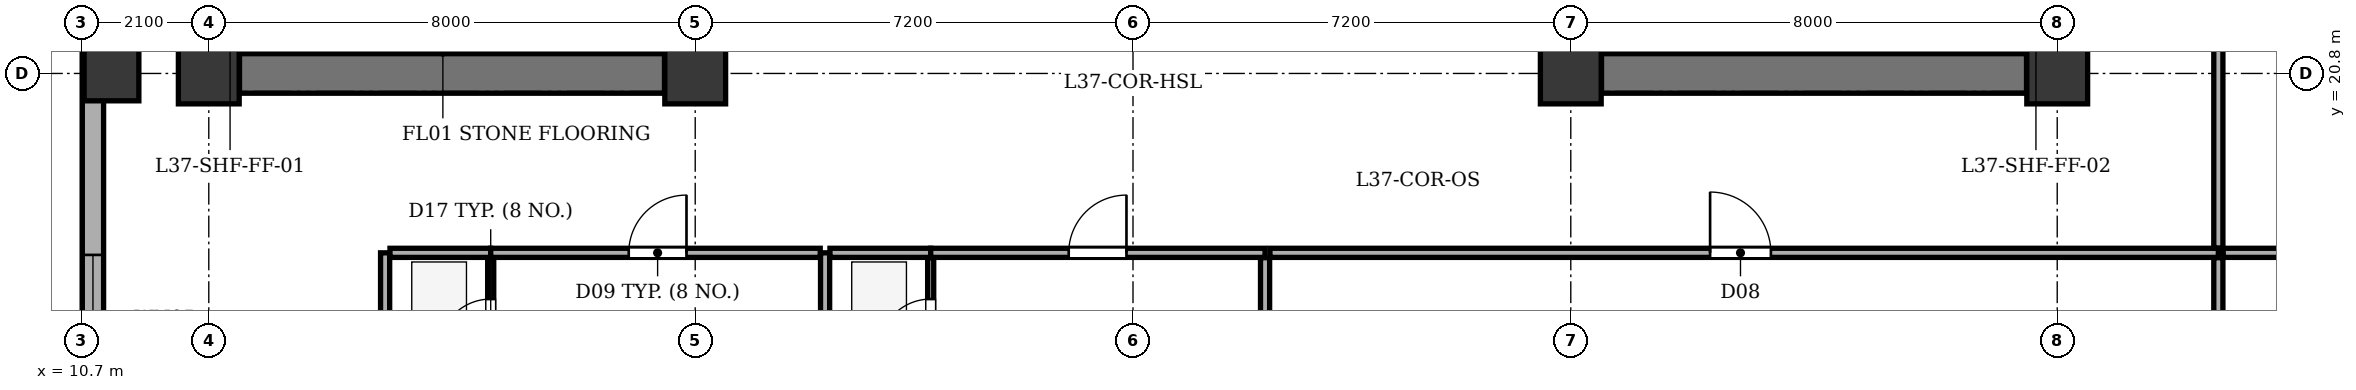
"""IFC4 building model, lengths in metres.
Left out: names, types, materials, properties, quantities, classifications, styles, units other than length and angle.
Written with IfcOpenShell. Run it as: python <this file> out.ifc"""

import sys

from ifc_helpers import new_model, si_unit, direction, frame, frame_2d, origin, origin_2d, place, context, subcontext, project, spatial, rectangle, extrude, element, fill, save


model = new_model("IFC4")
c1 = context("Model", 3, precision=1e-05, world=origin(), true_north=direction((0.0, 1.0)))
c2 = subcontext(c1, "Body", "Model", "MODEL_VIEW")
j1 = project(units=[si_unit("LENGTHUNIT", "METRE"), si_unit("PLANEANGLEUNIT", "RADIAN")], contexts=[c1])
p1 = place(None, origin())
s1 = spatial("IfcSite", under=j1, at=p1, CompositionType="ELEMENT")
p2 = place(p1, origin())
s2 = spatial("IfcBuilding", under=s1, at=p2, CompositionType="ELEMENT")
p3 = place(p2, frame((0.0, 0.0, 148.3)))
s3 = spatial("IfcBuildingStorey", under=s2, at=p3, CompositionType="ELEMENT", Elevation=148.3)
for number, where, z_axis, x_axis in (
    (1, (12.8, 20.8, 0.0), (0.0, 0.0, 1.0), (1.0, 0.0, 0.0)),
    (2, (20.8, 20.8, 0.0), (0.0, 0.0, 1.0), (1.0, 0.0, 0.0)),
    (3, (35.2, 20.8, 0.0), (0.0, 0.0, 1.0), (1.0, 0.0, 0.0)),
    (4, (43.2, 20.8, 0.0), (0.0, 0.0, 1.0), (1.0, 0.0, 0.0)),
):
    element("IfcColumn", number, at=place(p3, frame(where, z_axis=z_axis, x_axis=x_axis)), inside=s3, PredefinedType="COLUMN", context=c2, shape_type="SweptSolid", body=[
        extrude(rectangle(XDim=1.0, YDim=1.0, at=origin_2d()), origin(), (0.0, 0.0, 1.0), 3.5),
    ])
p4 = place(p3, frame((11.2, 20.8, 0.0), z_axis=(0.0, 0.0, 1.0), x_axis=(1.0, 0.0, 0.0)))
e5 = element("IfcColumn", 5, at=p4, inside=s3, PredefinedType="COLUMN", context=c2, shape_type="SweptSolid", body=[
    extrude(rectangle(XDim=0.9, YDim=0.9, at=origin_2d()), origin(), (0.0, 0.0, 1.0), 3.5),
])
p5 = place(p3, frame((10.895, 6.5, 0.0), z_axis=(0.0, 0.0, 1.0), x_axis=(0.0, 1.0, 0.0)))
e6 = element("IfcWall", 6, at=p5, inside=s3, PredefinedType="STANDARD", context=c2, shape_type="SweptSolid", body=[
    extrude(rectangle(XDim=35.0, YDim=0.35, at=frame_2d((17.5, 0.0))), origin(), (0.0, 0.0, 1.0), 2.785),
])
p6 = place(p5, frame((3.31, 0.0, 0.75)))
e7 = element("IfcOpeningElement", 7, at=p6, cuts=e6, PredefinedType="OPENING", context=c2, shape_type="SweptSolid", body=[
    extrude(rectangle(XDim=1.6, YDim=1.75, at=frame_2d((0.8, 0.875))), frame((0.0, 0.185, 0.0), z_axis=(0.0, -1.0, 0.0), x_axis=(1.0, 0.0, 0.0)), (0.0, 0.0, 1.0), 0.37),
])
p7 = place(p5, frame((9.216, 0.0, 0.75)))
e8 = element("IfcOpeningElement", 8, at=p7, cuts=e6, PredefinedType="OPENING", context=c2, shape_type="SweptSolid", body=[
    extrude(rectangle(XDim=2.1, YDim=1.75, at=frame_2d((1.05, 0.875))), frame((0.0, 0.185, 0.0), z_axis=(0.0, -1.0, 0.0), x_axis=(1.0, 0.0, 0.0)), (0.0, 0.0, 1.0), 0.37),
])
p8 = place(p5, frame((17.164, 0.0, 0.75)))
e9 = element("IfcOpeningElement", 9, at=p8, cuts=e6, PredefinedType="OPENING", context=c2, shape_type="SweptSolid", body=[
    extrude(rectangle(XDim=1.6, YDim=1.75, at=frame_2d((0.8, 0.875))), frame((0.0, 0.185, 0.0), z_axis=(0.0, -1.0, 0.0), x_axis=(1.0, 0.0, 0.0)), (0.0, 0.0, 1.0), 0.37),
])
p9 = place(p5, frame((22.386, 0.0, 0.75)))
e10 = element("IfcOpeningElement", 10, at=p9, cuts=e6, PredefinedType="OPENING", context=c2, shape_type="SweptSolid", body=[
    extrude(rectangle(XDim=2.1, YDim=1.75, at=frame_2d((1.05, 0.875))), frame((0.0, 0.185, 0.0), z_axis=(0.0, -1.0, 0.0), x_axis=(1.0, 0.0, 0.0)), (0.0, 0.0, 1.0), 0.37),
])
p10 = place(p5, frame((28.671, 0.0, 0.75)))
e11 = element("IfcOpeningElement", 11, at=p10, cuts=e6, PredefinedType="OPENING", context=c2, shape_type="SweptSolid", body=[
    extrude(rectangle(XDim=1.6, YDim=1.75, at=frame_2d((0.8, 0.875))), frame((0.0, 0.185, 0.0), z_axis=(0.0, -1.0, 0.0), x_axis=(1.0, 0.0, 0.0)), (0.0, 0.0, 1.0), 0.37),
])
p11 = place(p5, frame((31.755, 0.0, 0.75)))
e12 = element("IfcOpeningElement", 12, at=p11, cuts=e6, PredefinedType="OPENING", context=c2, shape_type="SweptSolid", body=[
    extrude(rectangle(XDim=1.6, YDim=1.75, at=frame_2d((0.8, 0.875))), frame((0.0, 0.185, 0.0), z_axis=(0.0, -1.0, 0.0), x_axis=(1.0, 0.0, 0.0)), (0.0, 0.0, 1.0), 0.37),
])
p12 = place(p3, frame((13.305, 20.8, 0.0), z_axis=(0.0, 0.0, 1.0), x_axis=(1.0, 0.0, 0.0)))
e13 = element("IfcWall", 13, at=p12, inside=s3, PredefinedType="SHEAR", context=c2, shape_type="SweptSolid", body=[
    extrude(rectangle(XDim=6.99, YDim=0.65, at=frame_2d((3.495, 0.0))), origin(), (0.0, 0.0, 1.0), 3.2),
])
p13 = place(p3, frame((16.435, 21.135, 0.0), z_axis=(0.0, 0.0, 1.0), x_axis=(0.0, 1.0, 0.0)))
e14 = element("IfcWall", 14, at=p13, inside=s3, PredefinedType="SHEAR", context=c2, shape_type="SweptSolid", body=[
    extrude(rectangle(XDim=12.13, YDim=0.25, at=frame_2d((6.065, 0.0))), origin(), (0.0, 0.0, 1.0), 3.2),
])
p14 = place(p13, frame((0.515, 0.0, 0.0)))
e15 = element("IfcOpeningElement", 15, at=p14, cuts=e14, PredefinedType="OPENING", context=c2, shape_type="SweptSolid", body=[
    extrude(rectangle(XDim=1.2, YDim=2.15, at=frame_2d((0.6, 1.075))), frame((0.0, 0.135, 0.0), z_axis=(0.0, -1.0, 0.0), x_axis=(1.0, 0.0, 0.0)), (0.0, 0.0, 1.0), 0.27),
])
p15 = place(p13, frame((2.665, 0.0, 0.0)))
e16 = element("IfcOpeningElement", 16, at=p15, cuts=e14, PredefinedType="OPENING", context=c2, shape_type="SweptSolid", body=[
    extrude(rectangle(XDim=1.15, YDim=2.15, at=frame_2d((0.575, 1.075))), frame((0.0, 0.135, 0.0), z_axis=(0.0, -1.0, 0.0), x_axis=(1.0, 0.0, 0.0)), (0.0, 0.0, 1.0), 0.27),
])
p16 = place(p3, frame((35.705, 20.8, 0.0), z_axis=(0.0, 0.0, 1.0), x_axis=(1.0, 0.0, 0.0)))
e17 = element("IfcWall", 17, at=p16, inside=s3, PredefinedType="SHEAR", context=c2, shape_type="SweptSolid", body=[
    extrude(rectangle(XDim=6.99, YDim=0.65, at=frame_2d((3.495, 0.0))), origin(), (0.0, 0.0, 1.0), 3.2),
])
p17 = place(p3, frame((39.565, 21.135, 0.0), z_axis=(0.0, 0.0, 1.0), x_axis=(0.0, 1.0, 0.0)))
e18 = element("IfcWall", 18, at=p17, inside=s3, PredefinedType="SHEAR", context=c2, shape_type="SweptSolid", body=[
    extrude(rectangle(XDim=12.13, YDim=0.25, at=frame_2d((6.065, 0.0))), origin(), (0.0, 0.0, 1.0), 3.2),
])
p18 = place(p17, frame((0.515, 0.0, 0.0)))
e19 = element("IfcOpeningElement", 19, at=p18, cuts=e18, PredefinedType="OPENING", context=c2, shape_type="SweptSolid", body=[
    extrude(rectangle(XDim=1.2, YDim=2.15, at=frame_2d((0.6, 1.075))), frame((0.0, 0.135, 0.0), z_axis=(0.0, -1.0, 0.0), x_axis=(1.0, 0.0, 0.0)), (0.0, 0.0, 1.0), 0.27),
])
p19 = place(p17, frame((2.665, 0.0, 0.0)))
e20 = element("IfcOpeningElement", 20, at=p19, cuts=e18, PredefinedType="OPENING", context=c2, shape_type="SweptSolid", body=[
    extrude(rectangle(XDim=1.15, YDim=2.15, at=frame_2d((0.575, 1.075))), frame((0.0, 0.135, 0.0), z_axis=(0.0, -1.0, 0.0), x_axis=(1.0, 0.0, 0.0)), (0.0, 0.0, 1.0), 0.27),
])
for number, where, z_axis, x_axis in (
    (21, (15.7, 1.875, 0.0), (0.0, 0.0, 1.0), (0.0, 1.0, 0.0)),
    (22, (22.936, 1.875, 0.0), (0.0, 0.0, 1.0), (0.0, 1.0, 0.0)),
):
    element("IfcWall", number, at=place(p3, frame(where, z_axis=z_axis, x_axis=x_axis)), inside=s3, PredefinedType="PARTITIONING", context=c2, shape_type="SweptSolid", body=[
        extrude(rectangle(XDim=15.975, YDim=0.15, at=frame_2d((7.988, 0.0))), origin(), (0.0, 0.0, 1.0), 3.2),
    ])
p20 = place(p3, frame((15.78, 17.85, 0.0), z_axis=(0.0, 0.0, 1.0), x_axis=(1.0, 0.0, 0.0)))
e23 = element("IfcWall", 23, at=p20, inside=s3, PredefinedType="PARTITIONING", context=c2, shape_type="SweptSolid", body=[
    extrude(rectangle(XDim=1.656, YDim=0.15, at=frame_2d((0.828, 0.0))), origin(), (0.0, 0.0, 1.0), 3.2),
])
p21 = place(p3, frame((17.437, 17.85, 0.0), z_axis=(0.0, 0.0, 1.0), x_axis=(1.0, 0.0, 0.0)))
e24 = element("IfcWall", 24, at=p21, inside=s3, PredefinedType="PARTITIONING", context=c2, shape_type="SweptSolid", body=[
    extrude(rectangle(XDim=5.419, YDim=0.15, at=frame_2d((2.71, 0.0))), origin(), (0.0, 0.0, 1.0), 3.2),
])
p22 = place(p21, frame((2.27, 0.0, 0.0)))
e25 = element("IfcOpeningElement", 25, at=p22, cuts=e24, PredefinedType="OPENING", context=c2, shape_type="SweptSolid", body=[
    extrude(rectangle(XDim=0.95, YDim=2.1, at=frame_2d((0.475, 1.05))), frame((0.0, 0.085, 0.0), z_axis=(0.0, -1.0, 0.0), x_axis=(1.0, 0.0, 0.0)), (0.0, 0.0, 1.0), 0.17),
])
p23 = place(p3, frame((17.437, 15.52, 0.0), z_axis=(0.0, 0.0, 1.0), x_axis=(0.0, 1.0, 0.0)))
e26 = element("IfcWall", 26, at=p23, inside=s3, PredefinedType="PARTITIONING", context=c2, shape_type="SweptSolid", body=[
    extrude(rectangle(XDim=2.25, YDim=0.1, at=frame_2d((1.125, 0.0))), origin(), (0.0, 0.0, 1.0), 3.2),
])
p24 = place(p23, frame((0.72, 0.0, 0.0)))
e27 = element("IfcOpeningElement", 27, at=p24, cuts=e26, PredefinedType="OPENING", context=c2, shape_type="SweptSolid", body=[
    extrude(rectangle(XDim=0.85, YDim=2.05, at=frame_2d((0.425, 1.025))), frame((0.0, 0.06, 0.0), z_axis=(0.0, -1.0, 0.0), x_axis=(1.0, 0.0, 0.0)), (0.0, 0.0, 1.0), 0.12),
])
p25 = place(p3, frame((23.016, 17.85, 0.0), z_axis=(0.0, 0.0, 1.0), x_axis=(1.0, 0.0, 0.0)))
e28 = element("IfcWall", 28, at=p25, inside=s3, PredefinedType="PARTITIONING", context=c2, shape_type="SweptSolid", body=[
    extrude(rectangle(XDim=1.656, YDim=0.15, at=frame_2d((0.828, 0.0))), origin(), (0.0, 0.0, 1.0), 3.2),
])
p26 = place(p3, frame((24.673, 17.85, 0.0), z_axis=(0.0, 0.0, 1.0), x_axis=(1.0, 0.0, 0.0)))
e29 = element("IfcWall", 29, at=p26, inside=s3, PredefinedType="PARTITIONING", context=c2, shape_type="SweptSolid", body=[
    extrude(rectangle(XDim=5.5, YDim=0.15, at=frame_2d((2.75, 0.0))), origin(), (0.0, 0.0, 1.0), 3.2),
])
p27 = place(p26, frame((2.27, 0.0, 0.0)))
e30 = element("IfcOpeningElement", 30, at=p27, cuts=e29, PredefinedType="OPENING", context=c2, shape_type="SweptSolid", body=[
    extrude(rectangle(XDim=0.95, YDim=2.1, at=frame_2d((0.475, 1.05))), frame((0.0, 0.085, 0.0), z_axis=(0.0, -1.0, 0.0), x_axis=(1.0, 0.0, 0.0)), (0.0, 0.0, 1.0), 0.17),
])
p28 = place(p3, frame((24.673, 15.52, 0.0), z_axis=(0.0, 0.0, 1.0), x_axis=(0.0, 1.0, 0.0)))
e31 = element("IfcWall", 31, at=p28, inside=s3, PredefinedType="PARTITIONING", context=c2, shape_type="SweptSolid", body=[
    extrude(rectangle(XDim=2.25, YDim=0.1, at=frame_2d((1.125, 0.0))), origin(), (0.0, 0.0, 1.0), 3.2),
])
p29 = place(p28, frame((0.72, 0.0, 0.0)))
e32 = element("IfcOpeningElement", 32, at=p29, cuts=e31, PredefinedType="OPENING", context=c2, shape_type="SweptSolid", body=[
    extrude(rectangle(XDim=0.85, YDim=2.05, at=frame_2d((0.425, 1.025))), frame((0.0, 0.06, 0.0), z_axis=(0.0, -1.0, 0.0), x_axis=(1.0, 0.0, 0.0)), (0.0, 0.0, 1.0), 0.12),
])
p30 = place(p3, frame((30.172, 1.875, 0.0), z_axis=(0.0, 0.0, 1.0), x_axis=(0.0, 1.0, 0.0)))
e33 = element("IfcWall", 33, at=p30, inside=s3, PredefinedType="PARTITIONING", context=c2, shape_type="SweptSolid", body=[
    extrude(rectangle(XDim=15.895, YDim=0.15, at=frame_2d((7.948, 0.0))), origin(), (0.0, 0.0, 1.0), 3.2),
])
p31 = place(p3, frame((30.252, 17.85, 0.0), z_axis=(0.0, 0.0, 1.0), x_axis=(1.0, 0.0, 0.0)))
e34 = element("IfcWall", 34, at=p31, inside=s3, PredefinedType="PARTITIONING", context=c2, shape_type="SweptSolid", body=[
    extrude(rectangle(XDim=15.598, YDim=0.15, at=frame_2d((7.799, 0.0))), origin(), (0.0, 0.0, 1.0), 3.2),
])
p32 = place(p31, frame((7.239, 0.0, 0.0)))
e35 = element("IfcOpeningElement", 35, at=p32, cuts=e34, PredefinedType="OPENING", context=c2, shape_type="SweptSolid", body=[
    extrude(rectangle(XDim=1.0, YDim=2.1, at=frame_2d((0.5, 1.05))), frame((0.0, 0.085, 0.0), z_axis=(0.0, -1.0, 0.0), x_axis=(1.0, 0.0, 0.0)), (0.0, 0.0, 1.0), 0.17),
])
p33 = place(p3, frame((45.85, 1.875, 0.0), z_axis=(0.0, 0.0, 1.0), x_axis=(0.0, 1.0, 0.0)))
e36 = element("IfcWall", 36, at=p33, inside=s3, PredefinedType="PARTITIONING", context=c2, shape_type="SweptSolid", body=[
    extrude(rectangle(XDim=15.895, YDim=0.15, at=frame_2d((7.948, 0.0))), origin(), (0.0, 0.0, 1.0), 3.2),
])
p34 = place(p3, frame((45.93, 17.85, 0.0), z_axis=(0.0, 0.0, 1.0), x_axis=(1.0, 0.0, 0.0)))
e37 = element("IfcWall", 37, at=p34, inside=s3, PredefinedType="PARTITIONING", context=c2, shape_type="SweptSolid", body=[
    extrude(rectangle(XDim=9.395, YDim=0.15, at=frame_2d((4.698, 0.0))), origin(), (0.0, 0.0, 1.0), 3.2),
])
p35 = place(p3, frame((45.85, 17.93, 0.0), z_axis=(0.0, 0.0, 1.0), x_axis=(0.0, 1.0, 0.0)))
e38 = element("IfcWall", 38, at=p35, inside=s3, PredefinedType="PARTITIONING", context=c2, shape_type="SweptSolid", body=[
    extrude(rectangle(XDim=18.54, YDim=0.15, at=frame_2d((9.27, 0.0))), origin(), (0.0, 0.0, 1.0), 3.2),
])
p36 = place(p35, frame((8.79, 0.0, 0.0)))
e39 = element("IfcOpeningElement", 39, at=p36, cuts=e38, PredefinedType="OPENING", context=c2, shape_type="SweptSolid", body=[
    extrude(rectangle(XDim=0.95, YDim=2.1, at=frame_2d((0.475, 1.05))), frame((0.0, 0.085, 0.0), z_axis=(0.0, -1.0, 0.0), x_axis=(1.0, 0.0, 0.0)), (0.0, 0.0, 1.0), 0.17),
])
p37 = place(p7, origin())
e40 = element("IfcWindow", 40, at=p37, inside=s3, PartitioningType="SINGLE_PANEL", PredefinedType="WINDOW", context=c2, shape_type="SweptSolid", body=[
    extrude(rectangle(XDim=2.1, YDim=1.75, at=frame_2d((1.05, 0.875))), frame((0.0, -0.01, 0.0), z_axis=(0.0, -1.0, 0.0), x_axis=(1.0, 0.0, 0.0)), (0.0, 0.0, 1.0), 0.06),
])
fill(e8, e40)
p38 = place(p24, origin())
e41 = element("IfcDoor", 41, at=p38, inside=s3, OperationType="SINGLE_SWING_LEFT", PredefinedType="DOOR", context=c2, shape_type="SweptSolid", body=[
    extrude(rectangle(XDim=0.85, YDim=2.05, at=frame_2d((0.425, 1.025))), frame((0.0, 0.025, 0.0), z_axis=(0.0, -1.0, 0.0), x_axis=(1.0, 0.0, 0.0)), (0.0, 0.0, 1.0), 0.05),
])
fill(e27, e41)
p39 = place(p22, origin())
e42 = element("IfcDoor", 42, at=p39, inside=s3, OperationType="SINGLE_SWING_RIGHT", PredefinedType="DOOR", context=c2, shape_type="SweptSolid", body=[
    extrude(rectangle(XDim=0.95, YDim=2.1, at=frame_2d((0.475, 1.05))), frame((0.0, 0.025, 0.0), z_axis=(0.0, -1.0, 0.0), x_axis=(1.0, 0.0, 0.0)), (0.0, 0.0, 1.0), 0.05),
])
fill(e25, e42)
p40 = place(p29, origin())
e43 = element("IfcDoor", 43, at=p40, inside=s3, OperationType="SINGLE_SWING_LEFT", PredefinedType="DOOR", context=c2, shape_type="SweptSolid", body=[
    extrude(rectangle(XDim=0.85, YDim=2.05, at=frame_2d((0.425, 1.025))), frame((0.0, 0.025, 0.0), z_axis=(0.0, -1.0, 0.0), x_axis=(1.0, 0.0, 0.0)), (0.0, 0.0, 1.0), 0.05),
])
fill(e32, e43)
p41 = place(p27, origin())
e44 = element("IfcDoor", 44, at=p41, inside=s3, OperationType="SINGLE_SWING_RIGHT", PredefinedType="DOOR", context=c2, shape_type="SweptSolid", body=[
    extrude(rectangle(XDim=0.95, YDim=2.1, at=frame_2d((0.475, 1.05))), frame((0.0, 0.025, 0.0), z_axis=(0.0, -1.0, 0.0), x_axis=(1.0, 0.0, 0.0)), (0.0, 0.0, 1.0), 0.05),
])
fill(e30, e44)
p42 = place(p32, origin())
e45 = element("IfcDoor", 45, at=p42, inside=s3, OperationType="SINGLE_SWING_LEFT", PredefinedType="DOOR", context=c2, shape_type="SweptSolid", body=[
    extrude(rectangle(XDim=1.0, YDim=2.1, at=frame_2d((0.5, 1.05))), frame((0.0, 0.025, 0.0), z_axis=(0.0, -1.0, 0.0), x_axis=(1.0, 0.0, 0.0)), (0.0, 0.0, 1.0), 0.05),
])
fill(e35, e45)
save(model, sys.argv[1])
